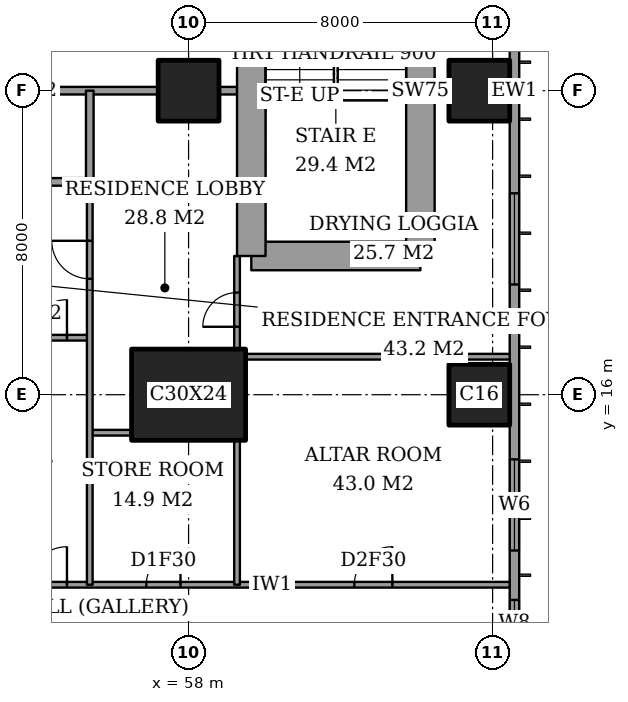
"""IFC4 building model, lengths in metres.
Left out: names, types, materials, properties, quantities, classifications, styles, units other than length and angle.
Written with IfcOpenShell. Run it as: python <this file> out.ifc"""

import sys

from ifc_helpers import new_model, si_unit, direction, frame, frame_2d, origin, origin_2d, place, context, subcontext, project, spatial, rectangle, extrude, element, fill, save


model = new_model("IFC4")
c1 = context("Model", 3, precision=1e-05, world=origin(), true_north=direction((0.0, 1.0)))
c2 = subcontext(c1, "Body", "Model", "MODEL_VIEW")
j1 = project(units=[si_unit("LENGTHUNIT", "METRE"), si_unit("PLANEANGLEUNIT", "RADIAN")], contexts=[c1])
p1 = place(None, origin())
s1 = spatial("IfcSite", under=j1, at=p1, CompositionType="ELEMENT")
p2 = place(p1, origin())
s2 = spatial("IfcBuilding", under=s1, at=p2, CompositionType="ELEMENT")
p3 = place(p2, frame((0.0, 0.0, 234.0)))
s3 = spatial("IfcBuildingStorey", under=s2, at=p3, CompositionType="ELEMENT", Elevation=234.0)
p4 = place(p3, frame((58.0, 16.0, 0.0), z_axis=(0.0, 0.0, 1.0), x_axis=(1.0, 0.0, 0.0)))
e1 = element("IfcColumn", 1, at=p4, inside=s3, PredefinedType="COLUMN", context=c2, shape_type="SweptSolid", body=[
    extrude(rectangle(XDim=3.0, YDim=2.4, at=origin_2d()), origin(), (0.0, 0.0, 1.0), 3.6),
])
for number, where, z_axis, x_axis in (
    (2, (58.0, 24.0, 0.0), (0.0, 0.0, 1.0), (1.0, 0.0, 0.0)),
    (3, (65.65, 16.0, 0.0), (0.0, 0.0, 1.0), (1.0, 0.0, 0.0)),
    (4, (65.65, 24.0, 0.0), (0.0, 0.0, 1.0), (1.0, 0.0, 0.0)),
):
    element("IfcColumn", number, at=place(p3, frame(where, z_axis=z_axis, x_axis=x_axis)), inside=s3, PredefinedType="COLUMN", context=c2, shape_type="SweptSolid", body=[
        extrude(rectangle(XDim=1.6, YDim=1.6, at=origin_2d()), origin(), (0.0, 0.0, 1.0), 3.6),
    ])
p5 = place(p3, frame((59.65, 19.65, 0.0), z_axis=(0.0, 0.0, 1.0), x_axis=(1.0, 0.0, 0.0)))
e5 = element("IfcWall", 5, at=p5, inside=s3, PredefinedType="SHEAR", context=c2, shape_type="SweptSolid", body=[
    extrude(rectangle(XDim=4.45, YDim=0.75, at=frame_2d((2.225, 0.0))), origin(), (0.0, 0.0, 1.0), 3.6),
])
p6 = place(p3, frame((64.1, 19.65, 0.0), z_axis=(0.0, 0.0, 1.0), x_axis=(0.0, 1.0, 0.0)))
e6 = element("IfcWall", 6, at=p6, inside=s3, PredefinedType="SHEAR", context=c2, shape_type="SweptSolid", body=[
    extrude(rectangle(XDim=8.7, YDim=0.75, at=frame_2d((4.35, 0.0))), origin(), (0.0, 0.0, 1.0), 3.6),
])
p7 = place(p3, frame((59.65, 28.35, 0.0), z_axis=(0.0, 0.0, 1.0), x_axis=(0.0, -1.0, 0.0)))
e7 = element("IfcWall", 7, at=p7, inside=s3, PredefinedType="SHEAR", context=c2, shape_type="SweptSolid", body=[
    extrude(rectangle(XDim=8.7, YDim=0.75, at=frame_2d((4.35, 0.0))), origin(), (0.0, 0.0, 1.0), 3.6),
])
p8 = place(p7, frame((0.975, 0.0, 0.0)))
e8 = element("IfcOpeningElement", 8, at=p8, cuts=e7, PredefinedType="OPENING", context=c2, shape_type="SweptSolid", body=[
    extrude(rectangle(XDim=1.0, YDim=2.1, at=frame_2d((0.5, 1.05))), frame((0.0, 0.385, 0.0), z_axis=(0.0, -1.0, 0.0), x_axis=(1.0, 0.0, 0.0)), (0.0, 0.0, 1.0), 0.77),
])
p9 = place(p3, frame((66.575, 3.175, 0.0), z_axis=(0.0, 0.0, 1.0), x_axis=(0.0, 1.0, 0.0)))
e9 = element("IfcWall", 9, at=p9, inside=s3, PredefinedType="SOLIDWALL", context=c2, shape_type="SweptSolid", body=[
    extrude(rectangle(XDim=41.65, YDim=0.25, at=frame_2d((20.825, 0.0))), origin(), (0.0, 0.0, 1.0), 3.6),
])
p10 = place(p9, frame((0.875, 0.0, 0.6)))
e10 = element("IfcOpeningElement", 10, at=p10, cuts=e9, PredefinedType="OPENING", context=c2, shape_type="SweptSolid", body=[
    extrude(rectangle(XDim=2.4, YDim=2.0, at=frame_2d((1.2, 1.0))), frame((0.0, 0.135, 0.0), z_axis=(0.0, -1.0, 0.0), x_axis=(1.0, 0.0, 0.0)), (0.0, 0.0, 1.0), 0.27),
])
p11 = place(p9, frame((6.225, 0.0, 0.6)))
e11 = element("IfcOpeningElement", 11, at=p11, cuts=e9, PredefinedType="OPENING", context=c2, shape_type="SweptSolid", body=[
    extrude(rectangle(XDim=1.2, YDim=2.0, at=frame_2d((0.6, 1.0))), frame((0.0, 0.135, 0.0), z_axis=(0.0, -1.0, 0.0), x_axis=(1.0, 0.0, 0.0)), (0.0, 0.0, 1.0), 0.27),
])
p12 = place(p9, frame((8.725, 0.0, 0.6)))
e12 = element("IfcOpeningElement", 12, at=p12, cuts=e9, PredefinedType="OPENING", context=c2, shape_type="SweptSolid", body=[
    extrude(rectangle(XDim=2.4, YDim=2.0, at=frame_2d((1.2, 1.0))), frame((0.0, 0.135, 0.0), z_axis=(0.0, -1.0, 0.0), x_axis=(1.0, 0.0, 0.0)), (0.0, 0.0, 1.0), 0.27),
])
p13 = place(p9, frame((15.725, 0.0, 0.6)))
e13 = element("IfcOpeningElement", 13, at=p13, cuts=e9, PredefinedType="OPENING", context=c2, shape_type="SweptSolid", body=[
    extrude(rectangle(XDim=2.4, YDim=2.0, at=frame_2d((1.2, 1.0))), frame((0.0, 0.135, 0.0), z_axis=(0.0, -1.0, 0.0), x_axis=(1.0, 0.0, 0.0)), (0.0, 0.0, 1.0), 0.27),
])
p14 = place(p9, frame((23.525, 0.0, 0.6)))
e14 = element("IfcOpeningElement", 14, at=p14, cuts=e9, PredefinedType="OPENING", context=c2, shape_type="SweptSolid", body=[
    extrude(rectangle(XDim=2.4, YDim=2.0, at=frame_2d((1.2, 1.0))), frame((0.0, 0.135, 0.0), z_axis=(0.0, -1.0, 0.0), x_axis=(1.0, 0.0, 0.0)), (0.0, 0.0, 1.0), 0.27),
])
p15 = place(p9, frame((30.725, 0.0, 0.6)))
e15 = element("IfcOpeningElement", 15, at=p15, cuts=e9, PredefinedType="OPENING", context=c2, shape_type="SweptSolid", body=[
    extrude(rectangle(XDim=2.4, YDim=2.0, at=frame_2d((1.2, 1.0))), frame((0.0, 0.135, 0.0), z_axis=(0.0, -1.0, 0.0), x_axis=(1.0, 0.0, 0.0)), (0.0, 0.0, 1.0), 0.27),
])
p16 = place(p9, frame((34.525, 0.0, 0.6)))
e16 = element("IfcOpeningElement", 16, at=p16, cuts=e9, PredefinedType="OPENING", context=c2, shape_type="SweptSolid", body=[
    extrude(rectangle(XDim=1.2, YDim=2.0, at=frame_2d((0.6, 1.0))), frame((0.0, 0.135, 0.0), z_axis=(0.0, -1.0, 0.0), x_axis=(1.0, 0.0, 0.0)), (0.0, 0.0, 1.0), 0.27),
])
p17 = place(p9, frame((38.375, 0.0, 0.6)))
e17 = element("IfcOpeningElement", 17, at=p17, cuts=e9, PredefinedType="OPENING", context=c2, shape_type="SweptSolid", body=[
    extrude(rectangle(XDim=2.4, YDim=2.0, at=frame_2d((1.2, 1.0))), frame((0.0, 0.135, 0.0), z_axis=(0.0, -1.0, 0.0), x_axis=(1.0, 0.0, 0.0)), (0.0, 0.0, 1.0), 0.27),
])
p18 = place(p3, frame((41.439, 11.0, 0.0), z_axis=(0.0, 0.0, 1.0), x_axis=(1.0, 0.0, 0.0)))
e18 = element("IfcWall", 18, at=p18, inside=s3, PredefinedType="PARTITIONING", context=c2, shape_type="SweptSolid", body=[
    extrude(rectangle(XDim=25.011, YDim=0.15, at=frame_2d((12.505, 0.0))), origin(), (0.0, 0.0, 1.0), 3.35),
])
p19 = place(p18, frame((12.361, 0.0, 0.0)))
e19 = element("IfcOpeningElement", 19, at=p19, cuts=e18, PredefinedType="OPENING", context=c2, shape_type="SweptSolid", body=[
    extrude(rectangle(XDim=1.0, YDim=2.1, at=frame_2d((0.5, 1.05))), frame((0.0, 0.085, 0.0), z_axis=(0.0, -1.0, 0.0), x_axis=(1.0, 0.0, 0.0)), (0.0, 0.0, 1.0), 0.17),
])
p20 = place(p18, frame((20.924, 0.0, 0.0)))
e20 = element("IfcOpeningElement", 20, at=p20, cuts=e18, PredefinedType="OPENING", context=c2, shape_type="SweptSolid", body=[
    extrude(rectangle(XDim=1.0, YDim=2.1, at=frame_2d((0.5, 1.05))), frame((0.0, 0.085, 0.0), z_axis=(0.0, -1.0, 0.0), x_axis=(1.0, 0.0, 0.0)), (0.0, 0.0, 1.0), 0.17),
])
p21 = place(p18, frame((15.448, 0.0, 0.0)))
e21 = element("IfcOpeningElement", 21, at=p21, cuts=e18, PredefinedType="OPENING", context=c2, shape_type="SweptSolid", body=[
    extrude(rectangle(XDim=0.9, YDim=2.1, at=frame_2d((0.45, 1.05))), frame((0.0, 0.085, 0.0), z_axis=(0.0, -1.0, 0.0), x_axis=(1.0, 0.0, 0.0)), (0.0, 0.0, 1.0), 0.17),
])
p22 = place(p18, frame((9.961, 0.0, 0.0)))
e22 = element("IfcOpeningElement", 22, at=p22, cuts=e18, PredefinedType="OPENING", context=c2, shape_type="SweptSolid", body=[
    extrude(rectangle(XDim=1.0, YDim=2.1, at=frame_2d((0.5, 1.05))), frame((0.0, 0.085, 0.0), z_axis=(0.0, -1.0, 0.0), x_axis=(1.0, 0.0, 0.0)), (0.0, 0.0, 1.0), 0.17),
])
p23 = place(p18, frame((7.411, 0.0, 0.0)))
e23 = element("IfcOpeningElement", 23, at=p23, cuts=e18, PredefinedType="OPENING", context=c2, shape_type="SweptSolid", body=[
    extrude(rectangle(XDim=0.9, YDim=2.1, at=frame_2d((0.45, 1.05))), frame((0.0, 0.085, 0.0), z_axis=(0.0, -1.0, 0.0), x_axis=(1.0, 0.0, 0.0)), (0.0, 0.0, 1.0), 0.17),
])
p24 = place(p18, frame((2.836, 0.0, 0.0)))
e24 = element("IfcOpeningElement", 24, at=p24, cuts=e18, PredefinedType="OPENING", context=c2, shape_type="SweptSolid", body=[
    extrude(rectangle(XDim=1.0, YDim=2.1, at=frame_2d((0.5, 1.05))), frame((0.0, 0.085, 0.0), z_axis=(0.0, -1.0, 0.0), x_axis=(1.0, 0.0, 0.0)), (0.0, 0.0, 1.0), 0.17),
])
p25 = place(p3, frame((55.4, 15.0, 0.0), z_axis=(0.0, 0.0, 1.0), x_axis=(1.0, 0.0, 0.0)))
e25 = element("IfcWall", 25, at=p25, inside=s3, PredefinedType="PARTITIONING", context=c2, shape_type="SweptSolid", body=[
    extrude(rectangle(XDim=1.1, YDim=0.15, at=frame_2d((0.55, 0.0))), origin(), (0.0, 0.0, 1.0), 3.35),
])
p26 = place(p3, frame((59.5, 17.0, 0.0), z_axis=(0.0, 0.0, 1.0), x_axis=(1.0, 0.0, 0.0)))
e26 = element("IfcWall", 26, at=p26, inside=s3, PredefinedType="PARTITIONING", context=c2, shape_type="SweptSolid", body=[
    extrude(rectangle(XDim=6.95, YDim=0.15, at=frame_2d((3.475, 0.0))), origin(), (0.0, 0.0, 1.0), 3.35),
])
p27 = place(p3, frame((51.6, 17.5, 0.0), z_axis=(0.0, 0.0, 1.0), x_axis=(1.0, 0.0, 0.0)))
e27 = element("IfcWall", 27, at=p27, inside=s3, PredefinedType="PARTITIONING", context=c2, shape_type="SweptSolid", body=[
    extrude(rectangle(XDim=3.8, YDim=0.15, at=frame_2d((1.9, 0.0))), origin(), (0.0, 0.0, 1.0), 3.35),
])
p28 = place(p27, frame((2.2, 0.0, 0.0)))
e28 = element("IfcOpeningElement", 28, at=p28, cuts=e27, PredefinedType="OPENING", context=c2, shape_type="SweptSolid", body=[
    extrude(rectangle(XDim=1.0, YDim=2.1, at=frame_2d((0.5, 1.05))), frame((0.0, 0.085, 0.0), z_axis=(0.0, -1.0, 0.0), x_axis=(1.0, 0.0, 0.0)), (0.0, 0.0, 1.0), 0.17),
])
p29 = place(p3, frame((51.2, 21.6, 0.0), z_axis=(0.0, 0.0, 1.0), x_axis=(1.0, 0.0, 0.0)))
e29 = element("IfcWall", 29, at=p29, inside=s3, PredefinedType="PARTITIONING", context=c2, shape_type="SweptSolid", body=[
    extrude(rectangle(XDim=4.2, YDim=0.2, at=frame_2d((2.1, 0.0))), origin(), (0.0, 0.0, 1.0), 3.35),
])
p30 = place(p29, frame((1.65, 0.0, 0.0)))
e30 = element("IfcOpeningElement", 30, at=p30, cuts=e29, PredefinedType="OPENING", context=c2, shape_type="SweptSolid", body=[
    extrude(rectangle(XDim=0.9, YDim=2.1, at=frame_2d((0.45, 1.05))), frame((0.0, 0.11, 0.0), z_axis=(0.0, -1.0, 0.0), x_axis=(1.0, 0.0, 0.0)), (0.0, 0.0, 1.0), 0.22),
])
p31 = place(p3, frame((50.8, 24.0, 0.0), z_axis=(0.0, 0.0, 1.0), x_axis=(1.0, 0.0, 0.0)))
e31 = element("IfcWall", 31, at=p31, inside=s3, PredefinedType="PARTITIONING", context=c2, shape_type="SweptSolid", body=[
    extrude(rectangle(XDim=6.4, YDim=0.2, at=frame_2d((3.2, 0.0))), origin(), (0.0, 0.0, 1.0), 3.35),
])
p32 = place(p3, frame((58.8, 24.0, 0.0), z_axis=(0.0, 0.0, 1.0), x_axis=(1.0, 0.0, 0.0)))
e32 = element("IfcWall", 32, at=p32, inside=s3, PredefinedType="PARTITIONING", context=c2, shape_type="SweptSolid", body=[
    extrude(rectangle(XDim=0.475, YDim=0.2, at=frame_2d((0.237, 0.0))), origin(), (0.0, 0.0, 1.0), 3.35),
])
p33 = place(p3, frame((64.475, 24.0, 0.0), z_axis=(0.0, 0.0, 1.0), x_axis=(1.0, 0.0, 0.0)))
e33 = element("IfcWall", 33, at=p33, inside=s3, PredefinedType="PARTITIONING", context=c2, shape_type="SweptSolid", body=[
    extrude(rectangle(XDim=0.375, YDim=0.15, at=frame_2d((0.188, 0.0))), origin(), (0.0, 0.0, 1.0), 3.35),
])
p34 = place(p3, frame((55.4, 21.6, 0.0), z_axis=(0.0, 0.0, 1.0), x_axis=(0.0, 1.0, 0.0)))
e34 = element("IfcWall", 34, at=p34, inside=s3, PredefinedType="PARTITIONING", context=c2, shape_type="SweptSolid", body=[
    extrude(rectangle(XDim=2.4, YDim=0.2, at=frame_2d((1.2, 0.0))), origin(), (0.0, 0.0, 1.0), 3.35),
])
p35 = place(p3, frame((55.4, 11.0, 0.0), z_axis=(0.0, 0.0, 1.0), x_axis=(0.0, 1.0, 0.0)))
e35 = element("IfcWall", 35, at=p35, inside=s3, PredefinedType="PARTITIONING", context=c2, shape_type="SweptSolid", body=[
    extrude(rectangle(XDim=10.6, YDim=0.15, at=frame_2d((5.3, 0.0))), origin(), (0.0, 0.0, 1.0), 3.35),
])
p36 = place(p35, frame((8.05, 0.0, 0.0)))
e36 = element("IfcOpeningElement", 36, at=p36, cuts=e35, PredefinedType="OPENING", context=c2, shape_type="SweptSolid", body=[
    extrude(rectangle(XDim=1.0, YDim=2.1, at=frame_2d((0.5, 1.05))), frame((0.0, 0.085, 0.0), z_axis=(0.0, -1.0, 0.0), x_axis=(1.0, 0.0, 0.0)), (0.0, 0.0, 1.0), 0.17),
])
p37 = place(p3, frame((59.275, 11.0, 0.0), z_axis=(0.0, 0.0, 1.0), x_axis=(0.0, 1.0, 0.0)))
e37 = element("IfcWall", 37, at=p37, inside=s3, PredefinedType="PARTITIONING", context=c2, shape_type="SweptSolid", body=[
    extrude(rectangle(XDim=3.8, YDim=0.15, at=frame_2d((1.9, 0.0))), origin(), (0.0, 0.0, 1.0), 3.35),
])
p38 = place(p3, frame((59.275, 17.2, 0.0), z_axis=(0.0, 0.0, 1.0), x_axis=(0.0, 1.0, 0.0)))
e38 = element("IfcWall", 38, at=p38, inside=s3, PredefinedType="PARTITIONING", context=c2, shape_type="SweptSolid", body=[
    extrude(rectangle(XDim=2.45, YDim=0.15, at=frame_2d((1.225, 0.0))), origin(), (0.0, 0.0, 1.0), 3.35),
])
p39 = place(p38, frame((0.587, 0.0, 0.0)))
e39 = element("IfcOpeningElement", 39, at=p39, cuts=e38, PredefinedType="OPENING", context=c2, shape_type="SweptSolid", body=[
    extrude(rectangle(XDim=0.9, YDim=2.1, at=frame_2d((0.45, 1.05))), frame((0.0, 0.085, 0.0), z_axis=(0.0, -1.0, 0.0), x_axis=(1.0, 0.0, 0.0)), (0.0, 0.0, 1.0), 0.17),
])
p40 = place(p11, origin())
e40 = element("IfcWindow", 40, at=p40, inside=s3, PartitioningType="SINGLE_PANEL", PredefinedType="WINDOW", context=c2, shape_type="SweptSolid", body=[
    extrude(rectangle(XDim=1.2, YDim=2.0, at=frame_2d((0.6, 1.0))), frame((0.0, 0.03, 0.0), z_axis=(0.0, -1.0, 0.0), x_axis=(1.0, 0.0, 0.0)), (0.0, 0.0, 1.0), 0.06),
])
fill(e11, e40)
p41 = place(p12, origin())
e41 = element("IfcWindow", 41, at=p41, inside=s3, PartitioningType="SINGLE_PANEL", PredefinedType="WINDOW", context=c2, shape_type="SweptSolid", body=[
    extrude(rectangle(XDim=2.4, YDim=2.0, at=frame_2d((1.2, 1.0))), frame((0.0, 0.03, 0.0), z_axis=(0.0, -1.0, 0.0), x_axis=(1.0, 0.0, 0.0)), (0.0, 0.0, 1.0), 0.06),
])
fill(e12, e41)
p42 = place(p13, origin())
e42 = element("IfcWindow", 42, at=p42, inside=s3, PartitioningType="SINGLE_PANEL", PredefinedType="WINDOW", context=c2, shape_type="SweptSolid", body=[
    extrude(rectangle(XDim=2.4, YDim=2.0, at=frame_2d((1.2, 1.0))), frame((0.0, 0.03, 0.0), z_axis=(0.0, -1.0, 0.0), x_axis=(1.0, 0.0, 0.0)), (0.0, 0.0, 1.0), 0.06),
])
fill(e13, e42)
p43 = place(p19, origin())
e43 = element("IfcDoor", 43, at=p43, inside=s3, OperationType="SINGLE_SWING_LEFT", PredefinedType="DOOR", context=c2, shape_type="SweptSolid", body=[
    extrude(rectangle(XDim=1.0, YDim=2.1, at=frame_2d((0.5, 1.05))), frame((0.0, 0.025, 0.0), z_axis=(0.0, -1.0, 0.0), x_axis=(1.0, 0.0, 0.0)), (0.0, 0.0, 1.0), 0.05),
])
fill(e19, e43)
p44 = place(p20, origin())
e44 = element("IfcDoor", 44, at=p44, inside=s3, OperationType="SINGLE_SWING_LEFT", PredefinedType="DOOR", context=c2, shape_type="SweptSolid", body=[
    extrude(rectangle(XDim=1.0, YDim=2.1, at=frame_2d((0.5, 1.05))), frame((0.0, 0.025, 0.0), z_axis=(0.0, -1.0, 0.0), x_axis=(1.0, 0.0, 0.0)), (0.0, 0.0, 1.0), 0.05),
])
fill(e20, e44)
p45 = place(p39, origin())
e45 = element("IfcDoor", 45, at=p45, inside=s3, OperationType="SINGLE_SWING_RIGHT", PredefinedType="DOOR", context=c2, shape_type="SweptSolid", body=[
    extrude(rectangle(XDim=0.9, YDim=2.1, at=frame_2d((0.45, 1.05))), frame((0.0, 0.025, 0.0), z_axis=(0.0, -1.0, 0.0), x_axis=(1.0, 0.0, 0.0)), (0.0, 0.0, 1.0), 0.05),
])
fill(e39, e45)
p46 = place(p21, origin())
e46 = element("IfcDoor", 46, at=p46, inside=s3, OperationType="SINGLE_SWING_LEFT", PredefinedType="DOOR", context=c2, shape_type="SweptSolid", body=[
    extrude(rectangle(XDim=0.9, YDim=2.1, at=frame_2d((0.45, 1.05))), frame((0.0, 0.025, 0.0), z_axis=(0.0, -1.0, 0.0), x_axis=(1.0, 0.0, 0.0)), (0.0, 0.0, 1.0), 0.05),
])
fill(e21, e46)
p47 = place(p36, origin())
e47 = element("IfcDoor", 47, at=p47, inside=s3, OperationType="SINGLE_SWING_LEFT", PredefinedType="DOOR", context=c2, shape_type="SweptSolid", body=[
    extrude(rectangle(XDim=1.0, YDim=2.1, at=frame_2d((0.5, 1.05))), frame((0.0, 0.025, 0.0), z_axis=(0.0, -1.0, 0.0), x_axis=(1.0, 0.0, 0.0)), (0.0, 0.0, 1.0), 0.05),
])
fill(e36, e47)
p48 = place(p28, origin())
e48 = element("IfcDoor", 48, at=p48, inside=s3, OperationType="SINGLE_SWING_LEFT", PredefinedType="DOOR", context=c2, shape_type="SweptSolid", body=[
    extrude(rectangle(XDim=1.0, YDim=2.1, at=frame_2d((0.5, 1.05))), frame((0.0, 0.025, 0.0), z_axis=(0.0, -1.0, 0.0), x_axis=(1.0, 0.0, 0.0)), (0.0, 0.0, 1.0), 0.05),
])
fill(e28, e48)
save(model, sys.argv[1])
